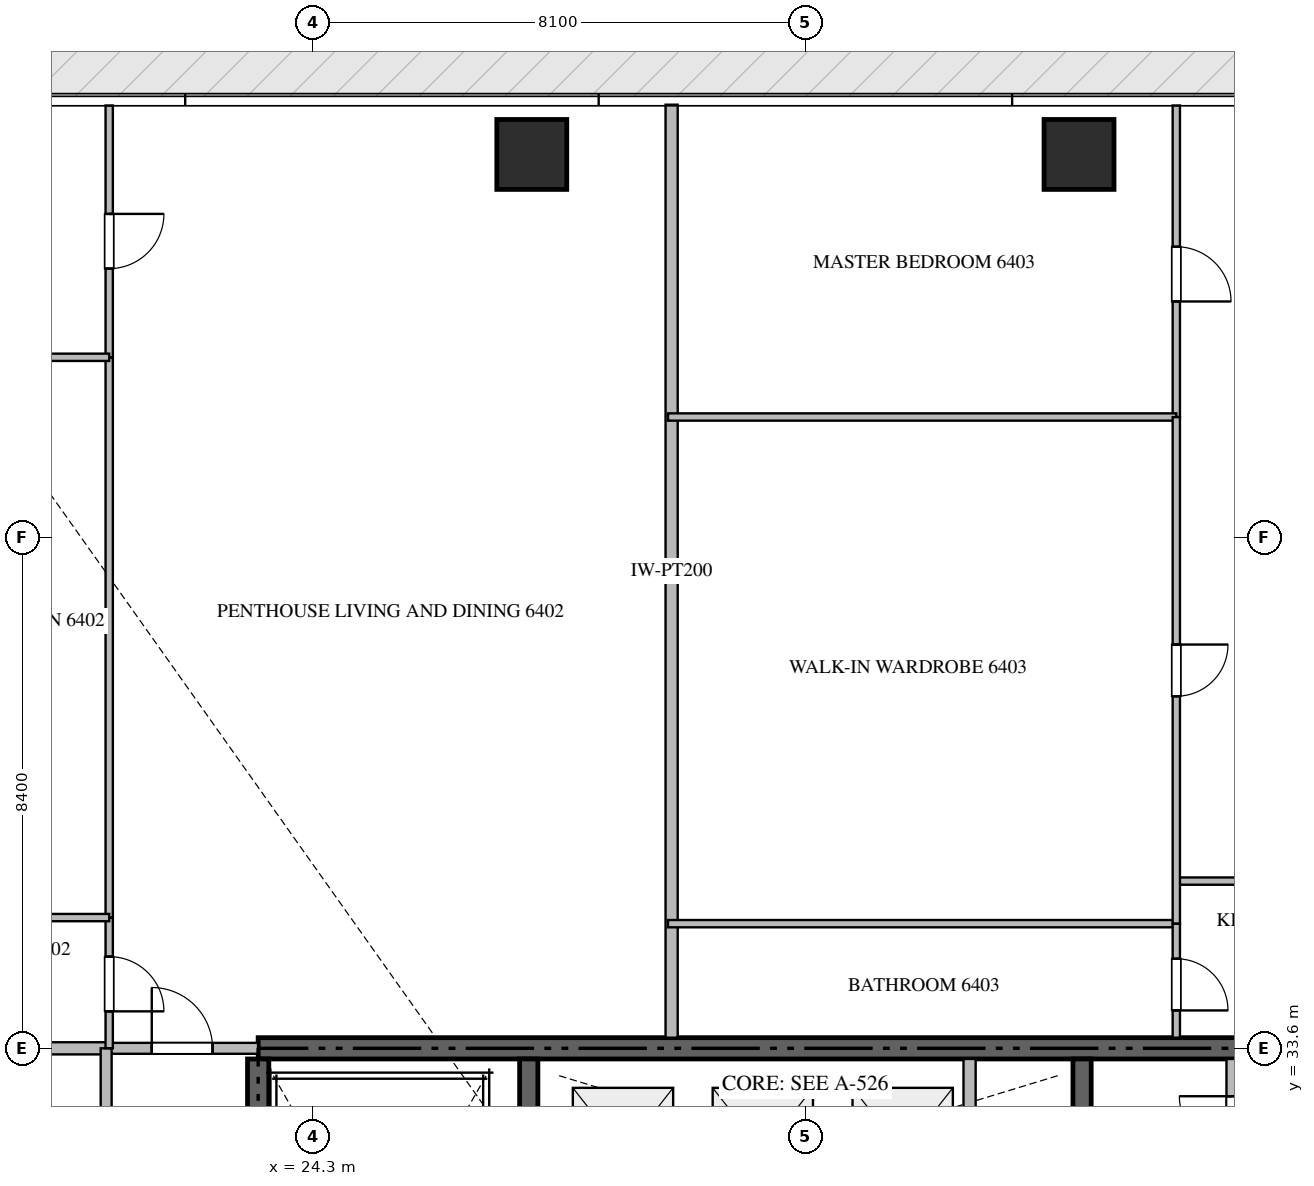
"""IFC4 building model, lengths in metres.
Left out: names, types, materials, properties, quantities, classifications, styles, units other than length and angle.
Written with IfcOpenShell. Run it as: python <this file> out.ifc"""

import sys

from ifc_helpers import new_model, si_unit, direction, frame, frame_2d, origin, origin_2d, place, context, subcontext, project, spatial, rectangle, extrude, source, transform, mapped, element, fill, save


model = new_model("IFC4")
c1 = context("Model", 3, precision=1e-05, world=origin(), true_north=direction((0.0, 1.0)))
c2 = subcontext(c1, "Body", "Model", "MODEL_VIEW")
j1 = project(units=[si_unit("LENGTHUNIT", "METRE"), si_unit("PLANEANGLEUNIT", "RADIAN")], contexts=[c1])
p1 = place(None, origin())
s1 = spatial("IfcSite", under=j1, at=p1, CompositionType="ELEMENT")
p2 = place(p1, origin())
s2 = spatial("IfcBuilding", under=s1, at=p2, CompositionType="ELEMENT")
p3 = place(p2, frame((0.0, 0.0, 256.65)))
s3 = spatial("IfcBuildingStorey", under=s2, at=p3, CompositionType="ELEMENT", Elevation=256.65)
p4 = place(p3, frame((41.4, 33.6, -0.26), z_axis=(0.0, 0.0, 1.0), x_axis=(-1.0, 0.0, 0.0)))
e1 = element("IfcWall", 1, at=p4, inside=s3, PredefinedType="SHEAR", context=c2, shape_type="SweptSolid", body=[
    extrude(rectangle(XDim=18.0, YDim=0.35, at=frame_2d((9.0, 0.0))), origin(), (0.0, 0.0, 1.0), 3.848),
])
p5 = place(p3, frame((23.4, 24.25, -0.26), z_axis=(0.0, 0.0, 1.0), x_axis=(0.0, 1.0, 0.0)))
e2 = element("IfcWall", 2, at=p5, inside=s3, PredefinedType="SHEAR", context=c2, shape_type="SweptSolid", body=[
    extrude(rectangle(XDim=9.175, YDim=0.35, at=frame_2d((4.587, 0.0))), origin(), (0.0, 0.0, 1.0), 3.848),
])
p6 = place(p3, frame((27.85, 23.55, -0.26), z_axis=(0.0, 0.0, 1.0), x_axis=(0.0, 1.0, 0.0)))
e3 = element("IfcWall", 3, at=p6, inside=s3, PredefinedType="SHEAR", context=c2, shape_type="SweptSolid", body=[
    extrude(rectangle(XDim=9.875, YDim=0.3, at=frame_2d((4.938, 0.0))), origin(), (0.0, 0.0, 1.0), 3.848),
])
p7 = place(p3, frame((36.95, 27.05, -0.26), z_axis=(0.0, 0.0, 1.0), x_axis=(0.0, 1.0, 0.0)))
e4 = element("IfcWall", 4, at=p7, inside=s3, PredefinedType="SHEAR", context=c2, shape_type="SweptSolid", body=[
    extrude(rectangle(XDim=6.375, YDim=0.3, at=frame_2d((3.188, 0.0))), origin(), (0.0, 0.0, 1.0), 3.848),
])
m1 = source(origin(), c2, "Body", "SweptSolid", [
    extrude(rectangle(XDim=1.15, YDim=1.15, at=origin_2d()), origin(), (0.0, 0.0, 1.0), 3.85),
])
for number, where, z_axis, x_axis in (
    (5, (27.9, 48.3, -0.26), (0.0, 0.0, 1.0), (1.0, 0.0, 0.0)),
    (6, (36.9, 48.3, -0.26), (0.0, 0.0, 1.0), (1.0, 0.0, 0.0)),
):
    element("IfcColumn", number, at=place(p3, frame(where, z_axis=z_axis, x_axis=x_axis)), inside=s3, PredefinedType="COLUMN", context=c2, shape_type="MappedRepresentation", body=[
        mapped(m1, transform((0.0, 0.0, 0.0), scale=1.0)),
    ])
p8 = place(p3, frame((35.1, 30.75, 0.0), z_axis=(0.0, 0.0, 1.0), x_axis=(0.0, 1.0, 0.0)))
e7 = element("IfcWall", 7, at=p8, inside=s3, PredefinedType="STANDARD", context=c2, shape_type="SweptSolid", body=[
    extrude(rectangle(XDim=2.675, YDim=0.2, at=frame_2d((1.337, 0.0))), origin(), (0.0, 0.0, 1.0), 3.59),
])
p9 = place(p3, frame((39.4, 31.35, 0.0), z_axis=(0.0, 0.0, 1.0), x_axis=(0.0, 1.0, 0.0)))
e8 = element("IfcWall", 8, at=p9, inside=s3, PredefinedType="PARTITIONING", context=c2, shape_type="SweptSolid", body=[
    extrude(rectangle(XDim=2.075, YDim=0.15, at=frame_2d((1.038, 0.0))), origin(), (0.0, 0.0, 1.0), 3.59),
])
p10 = place(p9, frame((0.612, 0.0, 0.0)))
e9 = element("IfcOpeningElement", 9, at=p10, cuts=e8, PredefinedType="OPENING", context=c2, shape_type="SweptSolid", body=[
    extrude(rectangle(XDim=0.85, YDim=2.1, at=frame_2d((0.425, 1.05))), frame((0.0, 0.085, 0.0), z_axis=(0.0, -1.0, 0.0), x_axis=(1.0, 0.0, 0.0)), (0.0, 0.0, 1.0), 0.17),
])
p11 = place(p3, frame((30.2, 33.775, 0.0), z_axis=(0.0, 0.0, 1.0), x_axis=(0.0, 1.0, 0.0)))
e10 = element("IfcWall", 10, at=p11, inside=s3, PredefinedType="PARTITIONING", context=c2, shape_type="SweptSolid", body=[
    extrude(rectangle(XDim=15.343, YDim=0.2, at=frame_2d((7.671, 0.0))), origin(), (0.0, 0.0, 1.0), 3.59),
])
p12 = place(p3, frame((7.482, 33.6, 0.0), z_axis=(0.0, 0.0, 1.0), x_axis=(1.0, 0.0, 0.0)))
e11 = element("IfcWall", 11, at=p12, inside=s3, PredefinedType="PARTITIONING", context=c2, shape_type="SweptSolid", body=[
    extrude(rectangle(XDim=13.418, YDim=0.2, at=frame_2d((6.709, 0.0))), origin(), (0.0, 0.0, 1.0), 3.59),
])
p13 = place(p3, frame((20.902, 33.6, 0.0), z_axis=(0.0, 0.0, 1.0), x_axis=(1.0, 0.0, 0.0)))
e12 = element("IfcWall", 12, at=p13, inside=s3, PredefinedType="PARTITIONING", context=c2, shape_type="SweptSolid", body=[
    extrude(rectangle(XDim=2.496, YDim=0.18, at=frame_2d((1.248, 0.0))), origin(), (0.0, 0.0, 1.0), 3.59),
])
p14 = place(p13, frame((0.748, 0.0, 0.0)))
e13 = element("IfcOpeningElement", 13, at=p14, cuts=e12, PredefinedType="OPENING", context=c2, shape_type="SweptSolid", body=[
    extrude(rectangle(XDim=1.0, YDim=2.15, at=frame_2d((0.5, 1.075))), frame((0.0, 0.1, 0.0), z_axis=(0.0, -1.0, 0.0), x_axis=(1.0, 0.0, 0.0)), (0.0, 0.0, 1.0), 0.2),
])
p15 = place(p3, frame((20.9, 16.8, 0.0), z_axis=(0.0, 0.0, 1.0), x_axis=(0.0, 1.0, 0.0)))
e14 = element("IfcWall", 14, at=p15, inside=s3, PredefinedType="PARTITIONING", context=c2, shape_type="SweptSolid", body=[
    extrude(rectangle(XDim=16.8, YDim=0.18, at=frame_2d((8.4, 0.0))), origin(), (0.0, 0.0, 1.0), 3.59),
])
p16 = place(p15, frame((3.018, 0.0, 0.0)))
e15 = element("IfcOpeningElement", 15, at=p16, cuts=e14, PredefinedType="OPENING", context=c2, shape_type="SweptSolid", body=[
    extrude(rectangle(XDim=1.0, YDim=2.15, at=frame_2d((0.5, 1.075))), frame((0.0, 0.1, 0.0), z_axis=(0.0, -1.0, 0.0), x_axis=(1.0, 0.0, 0.0)), (0.0, 0.0, 1.0), 0.2),
])
p17 = place(p15, frame((9.18, 0.0, 0.0)))
e16 = element("IfcOpeningElement", 16, at=p17, cuts=e14, PredefinedType="OPENING", context=c2, shape_type="SweptSolid", body=[
    extrude(rectangle(XDim=1.0, YDim=2.15, at=frame_2d((0.5, 1.075))), frame((0.0, 0.1, 0.0), z_axis=(0.0, -1.0, 0.0), x_axis=(1.0, 0.0, 0.0)), (0.0, 0.0, 1.0), 0.2),
])
p18 = place(p15, frame((14.5, 0.0, 0.0)))
e17 = element("IfcOpeningElement", 17, at=p18, cuts=e14, PredefinedType="OPENING", context=c2, shape_type="SweptSolid", body=[
    extrude(rectangle(XDim=1.0, YDim=2.15, at=frame_2d((0.5, 1.075))), frame((0.0, 0.1, 0.0), z_axis=(0.0, -1.0, 0.0), x_axis=(1.0, 0.0, 0.0)), (0.0, 0.0, 1.0), 0.2),
])
p19 = place(p3, frame((20.95, 35.75, 0.0), z_axis=(0.0, 0.0, 1.0), x_axis=(0.0, -1.0, 0.0)))
e18 = element("IfcWall", 18, at=p19, inside=s3, PredefinedType="PARTITIONING", context=c2, shape_type="SweptSolid", body=[
    extrude(rectangle(XDim=2.148, YDim=0.12, at=frame_2d((1.074, 0.0))), origin(), (0.0, 0.0, 1.0), 3.59),
])
p20 = place(p19, frame((0.642, 0.0, 0.0)))
e19 = element("IfcOpeningElement", 19, at=p20, cuts=e18, PredefinedType="OPENING", context=c2, shape_type="SweptSolid", body=[
    extrude(rectangle(XDim=0.9, YDim=2.1, at=frame_2d((0.45, 1.05))), frame((0.0, 0.07, 0.0), z_axis=(0.0, -1.0, 0.0), x_axis=(1.0, 0.0, 0.0)), (0.0, 0.0, 1.0), 0.14),
])
p21 = place(p3, frame((20.95, 49.105, 0.0), z_axis=(0.0, 0.0, 1.0), x_axis=(0.0, -1.0, 0.0)))
e20 = element("IfcWall", 20, at=p21, inside=s3, PredefinedType="PARTITIONING", context=c2, shape_type="SweptSolid", body=[
    extrude(rectangle(XDim=4.141, YDim=0.12, at=frame_2d((2.07, 0.0))), origin(), (0.0, 0.0, 1.0), 3.59),
])
p22 = place(p21, frame((1.783, 0.0, 0.0)))
e21 = element("IfcOpeningElement", 21, at=p22, cuts=e20, PredefinedType="OPENING", context=c2, shape_type="SweptSolid", body=[
    extrude(rectangle(XDim=0.9, YDim=2.1, at=frame_2d((0.45, 1.05))), frame((0.0, 0.07, 0.0), z_axis=(0.0, -1.0, 0.0), x_axis=(1.0, 0.0, 0.0)), (0.0, 0.0, 1.0), 0.14),
])
p23 = place(p3, frame((20.95, 44.962, 0.0), z_axis=(0.0, 0.0, 1.0), x_axis=(0.0, -1.0, 0.0)))
e22 = element("IfcWall", 22, at=p23, inside=s3, PredefinedType="PARTITIONING", context=c2, shape_type="SweptSolid", body=[
    extrude(rectangle(XDim=9.21, YDim=0.12, at=frame_2d((4.605, 0.0))), origin(), (0.0, 0.0, 1.0), 3.59),
])
p24 = place(p3, frame((15.85, 44.964, 0.0), z_axis=(0.0, 0.0, 1.0), x_axis=(1.0, 0.0, 0.0)))
e23 = element("IfcWall", 23, at=p24, inside=s3, PredefinedType="PARTITIONING", context=c2, shape_type="SweptSolid", body=[
    extrude(rectangle(XDim=5.1, YDim=0.12, at=frame_2d((2.55, 0.0))), origin(), (0.0, 0.0, 1.0), 3.59),
])
p25 = place(p3, frame((17.952, 35.75, 0.0), z_axis=(0.0, 0.0, 1.0), x_axis=(1.0, 0.0, 0.0)))
e24 = element("IfcWall", 24, at=p25, inside=s3, PredefinedType="PARTITIONING", context=c2, shape_type="SweptSolid", body=[
    extrude(rectangle(XDim=2.998, YDim=0.12, at=frame_2d((1.499, 0.0))), origin(), (0.0, 0.0, 1.0), 3.59),
])
p26 = place(p25, frame((1.074, 0.0, 0.0)))
e25 = element("IfcOpeningElement", 25, at=p26, cuts=e24, PredefinedType="OPENING", context=c2, shape_type="SweptSolid", body=[
    extrude(rectangle(XDim=0.85, YDim=2.1, at=frame_2d((0.425, 1.05))), frame((0.0, 0.07, 0.0), z_axis=(0.0, -1.0, 0.0), x_axis=(1.0, 0.0, 0.0)), (0.0, 0.0, 1.0), 0.14),
])
p27 = place(p3, frame((38.5, 36.35, 0.0), z_axis=(0.0, 0.0, 1.0), x_axis=(1.0, 0.0, 0.0)))
e26 = element("IfcWall", 26, at=p27, inside=s3, PredefinedType="PARTITIONING", context=c2, shape_type="SweptSolid", body=[
    extrude(rectangle(XDim=2.85, YDim=0.12, at=frame_2d((1.425, 0.0))), origin(), (0.0, 0.0, 1.0), 3.59),
])
p28 = place(p27, frame((1.0, 0.0, 0.0)))
e27 = element("IfcOpeningElement", 27, at=p28, cuts=e26, PredefinedType="OPENING", context=c2, shape_type="SweptSolid", body=[
    extrude(rectangle(XDim=0.85, YDim=2.1, at=frame_2d((0.425, 1.05))), frame((0.0, 0.07, 0.0), z_axis=(0.0, -1.0, 0.0), x_axis=(1.0, 0.0, 0.0)), (0.0, 0.0, 1.0), 0.14),
])
p29 = place(p3, frame((38.5, 49.105, 0.0), z_axis=(0.0, 0.0, 1.0), x_axis=(0.0, -1.0, 0.0)))
e28 = element("IfcWall", 28, at=p29, inside=s3, PredefinedType="PARTITIONING", context=c2, shape_type="SweptSolid", body=[
    extrude(rectangle(XDim=5.123, YDim=0.12, at=frame_2d((2.562, 0.0))), origin(), (0.0, 0.0, 1.0), 3.59),
])
p30 = place(p29, frame((2.323, 0.0, 0.0)))
e29 = element("IfcOpeningElement", 29, at=p30, cuts=e28, PredefinedType="OPENING", context=c2, shape_type="SweptSolid", body=[
    extrude(rectangle(XDim=0.9, YDim=2.1, at=frame_2d((0.45, 1.05))), frame((0.0, 0.07, 0.0), z_axis=(0.0, -1.0, 0.0), x_axis=(1.0, 0.0, 0.0)), (0.0, 0.0, 1.0), 0.14),
])
for number, where, z_axis, x_axis in (
    (30, (30.14, 43.982, 0.0), (0.0, 0.0, 1.0), (1.0, 0.0, 0.0)),
    (31, (30.14, 35.65, 0.0), (0.0, 0.0, 1.0), (1.0, 0.0, 0.0)),
):
    element("IfcWall", number, at=place(p3, frame(where, z_axis=z_axis, x_axis=x_axis)), inside=s3, PredefinedType="PARTITIONING", context=c2, shape_type="SweptSolid", body=[
        extrude(rectangle(XDim=8.36, YDim=0.12, at=frame_2d((4.18, 0.0))), origin(), (0.0, 0.0, 1.0), 3.59),
    ])
p31 = place(p3, frame((38.5, 43.98, 0.0), z_axis=(0.0, 0.0, 1.0), x_axis=(0.0, -1.0, 0.0)))
e32 = element("IfcWall", 32, at=p31, inside=s3, PredefinedType="PARTITIONING", context=c2, shape_type="SweptSolid", body=[
    extrude(rectangle(XDim=8.33, YDim=0.12, at=frame_2d((4.165, 0.0))), origin(), (0.0, 0.0, 1.0), 3.59),
])
p32 = place(p31, frame((3.74, 0.0, 0.0)))
e33 = element("IfcOpeningElement", 33, at=p32, cuts=e32, PredefinedType="OPENING", context=c2, shape_type="SweptSolid", body=[
    extrude(rectangle(XDim=0.85, YDim=2.1, at=frame_2d((0.425, 1.05))), frame((0.0, 0.07, 0.0), z_axis=(0.0, -1.0, 0.0), x_axis=(1.0, 0.0, 0.0)), (0.0, 0.0, 1.0), 0.14),
])
p33 = place(p3, frame((38.5, 35.648, 0.0), z_axis=(0.0, 0.0, 1.0), x_axis=(0.0, -1.0, 0.0)))
e34 = element("IfcWall", 34, at=p33, inside=s3, PredefinedType="PARTITIONING", context=c2, shape_type="SweptSolid", body=[
    extrude(rectangle(XDim=1.873, YDim=0.12, at=frame_2d((0.937, 0.0))), origin(), (0.0, 0.0, 1.0), 3.59),
])
p34 = place(p33, frame((0.575, 0.0, 0.0)))
e35 = element("IfcOpeningElement", 35, at=p34, cuts=e34, PredefinedType="OPENING", context=c2, shape_type="SweptSolid", body=[
    extrude(rectangle(XDim=0.85, YDim=2.1, at=frame_2d((0.425, 1.05))), frame((0.0, 0.07, 0.0), z_axis=(0.0, -1.0, 0.0), x_axis=(1.0, 0.0, 0.0)), (0.0, 0.0, 1.0), 0.14),
])
m2 = source(origin(), c2, "Body", "SweptSolid", [
    extrude(rectangle(XDim=0.85, YDim=2.1, at=frame_2d((0.425, 1.05))), frame((0.0, 0.025, 0.0), z_axis=(0.0, -1.0, 0.0), x_axis=(1.0, 0.0, 0.0)), (0.0, 0.0, 1.0), 0.05),
])
p35 = place(p10, origin())
e36 = element("IfcDoor", 36, at=p35, inside=s3, OperationType="SINGLE_SWING_RIGHT", PredefinedType="DOOR", context=c2, shape_type="MappedRepresentation", body=[
    mapped(m2, transform((0.0, 0.0, 0.0), scale=1.0)),
])
fill(e9, e36)
m3 = source(origin(), c2, "Body", "SweptSolid", [
    extrude(rectangle(XDim=1.0, YDim=2.15, at=frame_2d((0.5, 1.075))), frame((0.0, 0.025, 0.0), z_axis=(0.0, -1.0, 0.0), x_axis=(1.0, 0.0, 0.0)), (0.0, 0.0, 1.0), 0.05),
])
p36 = place(p14, origin())
e37 = element("IfcDoor", 37, at=p36, inside=s3, OperationType="SINGLE_SWING_LEFT", PredefinedType="DOOR", context=c2, shape_type="MappedRepresentation", body=[
    mapped(m3, transform((0.0, 0.0, 0.0), scale=1.0)),
])
fill(e13, e37)
m4 = source(origin(), c2, "Body", "SweptSolid", [
    extrude(rectangle(XDim=0.9, YDim=2.1, at=frame_2d((0.45, 1.05))), frame((0.0, 0.025, 0.0), z_axis=(0.0, -1.0, 0.0), x_axis=(1.0, 0.0, 0.0)), (0.0, 0.0, 1.0), 0.05),
])
p37 = place(p20, origin())
e38 = element("IfcDoor", 38, at=p37, inside=s3, OperationType="SINGLE_SWING_RIGHT", PredefinedType="DOOR", context=c2, shape_type="MappedRepresentation", body=[
    mapped(m4, transform((0.0, 0.0, 0.0), scale=1.0)),
])
fill(e19, e38)
p38 = place(p22, origin())
e39 = element("IfcDoor", 39, at=p38, inside=s3, OperationType="SINGLE_SWING_LEFT", PredefinedType="DOOR", context=c2, shape_type="MappedRepresentation", body=[
    mapped(m4, transform((0.0, 0.0, 0.0), scale=1.0)),
])
fill(e21, e39)
p39 = place(p30, origin())
e40 = element("IfcDoor", 40, at=p39, inside=s3, OperationType="SINGLE_SWING_RIGHT", PredefinedType="DOOR", context=c2, shape_type="MappedRepresentation", body=[
    mapped(m4, transform((0.0, 0.0, 0.0), scale=1.0)),
])
fill(e29, e40)
p40 = place(p32, origin())
e41 = element("IfcDoor", 41, at=p40, inside=s3, OperationType="SINGLE_SWING_LEFT", PredefinedType="DOOR", context=c2, shape_type="MappedRepresentation", body=[
    mapped(m2, transform((0.0, 0.0, 0.0), scale=1.0)),
])
fill(e33, e41)
p41 = place(p34, origin())
e42 = element("IfcDoor", 42, at=p41, inside=s3, OperationType="SINGLE_SWING_RIGHT", PredefinedType="DOOR", context=c2, shape_type="MappedRepresentation", body=[
    mapped(m2, transform((0.0, 0.0, 0.0), scale=1.0)),
])
fill(e35, e42)
save(model, sys.argv[1])
